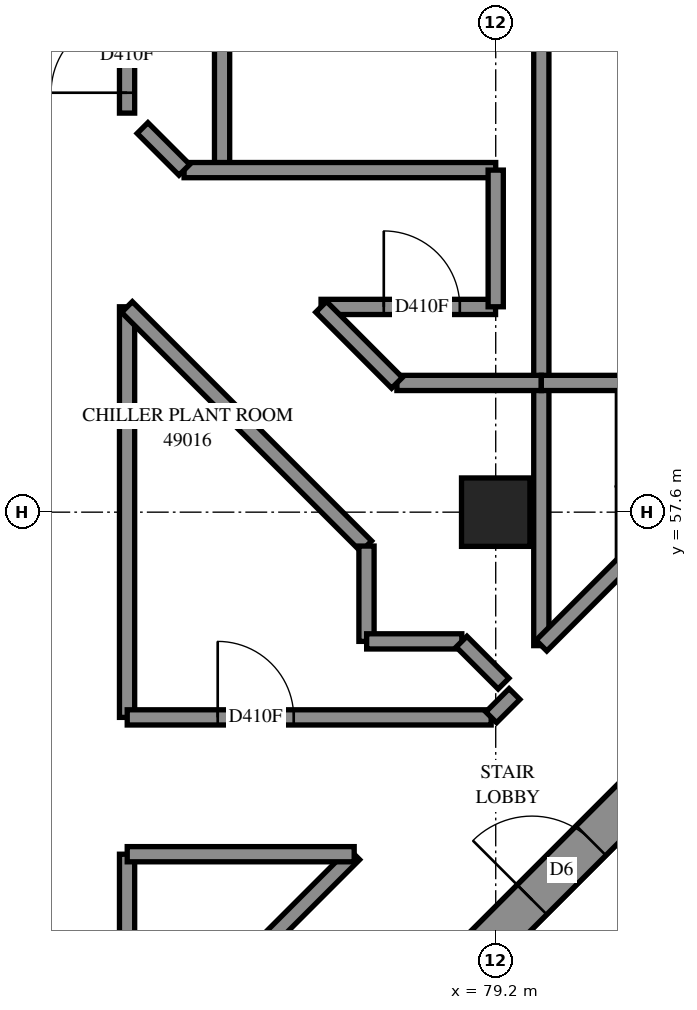
"""IFC4 building model, lengths in metres.
Left out: names, types, materials, properties, quantities, classifications, styles, units other than length and angle.
Written with IfcOpenShell. Run it as: python <this file> out.ifc"""

import sys

from ifc_helpers import new_model, si_unit, direction, frame, frame_2d, origin, origin_2d, place, context, subcontext, project, spatial, polyline, rectangle, outline, extrude, element, fill, save


model = new_model("IFC4")
c1 = context("Model", 3, precision=1e-05, world=origin(), true_north=direction((0.0, 1.0)))
c2 = subcontext(c1, "Body", "Model", "MODEL_VIEW")
j1 = project(units=[si_unit("LENGTHUNIT", "METRE"), si_unit("PLANEANGLEUNIT", "RADIAN")], contexts=[c1])
p1 = place(None, origin())
s1 = spatial("IfcSite", under=j1, at=p1, CompositionType="ELEMENT")
p2 = place(p1, origin())
s2 = spatial("IfcBuilding", under=s1, at=p2, CompositionType="ELEMENT")
p3 = place(p2, frame((0.0, 0.0, 180.4)))
s3 = spatial("IfcBuildingStorey", under=s2, at=p3, CompositionType="ELEMENT", Elevation=180.4)
p4 = place(p3, frame((79.2, 57.6, 0.0), z_axis=(0.0, 0.0, 1.0), x_axis=(1.0, 0.0, 0.0)))
e1 = element("IfcColumn", 1, at=p4, inside=s3, PredefinedType="COLUMN", context=c2, shape_type="SweptSolid", body=[
    extrude(rectangle(XDim=0.9, YDim=0.9, at=origin_2d()), origin(), (0.0, 0.0, 1.0), 4.7),
])
p5 = place(p3, frame((76.46, 49.284, -0.3), z_axis=(0.0, 0.0, 1.0), x_axis=(0.7071067812, 0.7071067812, 0.0)))
e2 = element("IfcWall", 2, at=p5, inside=s3, PredefinedType="SHEAR", context=c2, shape_type="SweptSolid", body=[
    extrude(rectangle(XDim=14.4, YDim=0.55, at=frame_2d((7.2, 0.0))), origin(), (0.0, 0.0, 1.0), 4.3),
])
p6 = place(p5, frame((4.55, 0.0, 0.3)))
e3 = element("IfcOpeningElement", 3, at=p6, cuts=e2, PredefinedType="OPENING", context=c2, shape_type="SweptSolid", body=[
    extrude(rectangle(XDim=1.1, YDim=2.1, at=frame_2d((0.55, 1.05))), frame((0.0, 0.285, 0.0), z_axis=(0.0, -1.0, 0.0), x_axis=(1.0, 0.0, 0.0)), (0.0, 0.0, 1.0), 0.57),
])
p7 = place(p5, frame((11.35, 0.0, 0.3)))
e4 = element("IfcOpeningElement", 4, at=p7, cuts=e2, PredefinedType="OPENING", context=c2, shape_type="SweptSolid", body=[
    extrude(rectangle(XDim=1.1, YDim=2.1, at=frame_2d((0.55, 1.05))), frame((0.0, 0.285, 0.0), z_axis=(0.0, -1.0, 0.0), x_axis=(1.0, 0.0, 0.0)), (0.0, 0.0, 1.0), 0.57),
])
p8 = place(p3, frame((100.024, 48.241, 0.0), z_axis=(0.0, 0.0, 1.0), x_axis=(-0.7071067812, 0.7071067812, 0.0)))
e5 = element("IfcWall", 5, at=p8, inside=s3, PredefinedType="SOLIDWALL", context=c2, shape_type="SweptSolid", body=[
    extrude(outline(polyline([(-0.275, -0.275), (30.779, -0.275), (30.552, 0.275), (0.275, 0.275), (-0.275, -0.275)])), origin(), (0.0, 0.0, 1.0), 4.7),
])
p9 = place(p8, frame((3.625, 0.0, 0.9)))
e6 = element("IfcOpeningElement", 6, at=p9, cuts=e5, PredefinedType="OPENING", context=c2, shape_type="SweptSolid", body=[
    extrude(rectangle(XDim=1.8, YDim=3.6, at=frame_2d((0.9, 1.8))), frame((0.0, 0.285, 0.0), z_axis=(0.0, -1.0, 0.0), x_axis=(1.0, 0.0, 0.0)), (0.0, 0.0, 1.0), 0.57),
])
p10 = place(p8, frame((7.225, 0.0, 0.9)))
e7 = element("IfcOpeningElement", 7, at=p10, cuts=e5, PredefinedType="OPENING", context=c2, shape_type="SweptSolid", body=[
    extrude(rectangle(XDim=1.8, YDim=3.6, at=frame_2d((0.9, 1.8))), frame((0.0, 0.285, 0.0), z_axis=(0.0, -1.0, 0.0), x_axis=(1.0, 0.0, 0.0)), (0.0, 0.0, 1.0), 0.57),
])
p11 = place(p8, frame((10.825, 0.0, 0.9)))
e8 = element("IfcOpeningElement", 8, at=p11, cuts=e5, PredefinedType="OPENING", context=c2, shape_type="SweptSolid", body=[
    extrude(rectangle(XDim=1.8, YDim=3.6, at=frame_2d((0.9, 1.8))), frame((0.0, 0.285, 0.0), z_axis=(0.0, -1.0, 0.0), x_axis=(1.0, 0.0, 0.0)), (0.0, 0.0, 1.0), 0.57),
])
p12 = place(p8, frame((14.425, 0.0, 0.9)))
e9 = element("IfcOpeningElement", 9, at=p12, cuts=e5, PredefinedType="OPENING", context=c2, shape_type="SweptSolid", body=[
    extrude(rectangle(XDim=1.8, YDim=3.6, at=frame_2d((0.9, 1.8))), frame((0.0, 0.285, 0.0), z_axis=(0.0, -1.0, 0.0), x_axis=(1.0, 0.0, 0.0)), (0.0, 0.0, 1.0), 0.57),
])
p13 = place(p8, frame((17.575, 0.0, 0.9)))
e10 = element("IfcOpeningElement", 10, at=p13, cuts=e5, PredefinedType="OPENING", context=c2, shape_type="SweptSolid", body=[
    extrude(rectangle(XDim=1.8, YDim=3.6, at=frame_2d((0.9, 1.8))), frame((0.0, 0.285, 0.0), z_axis=(0.0, -1.0, 0.0), x_axis=(1.0, 0.0, 0.0)), (0.0, 0.0, 1.0), 0.57),
])
p14 = place(p8, frame((21.625, 0.0, 0.9)))
e11 = element("IfcOpeningElement", 11, at=p14, cuts=e5, PredefinedType="OPENING", context=c2, shape_type="SweptSolid", body=[
    extrude(rectangle(XDim=1.8, YDim=3.6, at=frame_2d((0.9, 1.8))), frame((0.0, 0.285, 0.0), z_axis=(0.0, -1.0, 0.0), x_axis=(1.0, 0.0, 0.0)), (0.0, 0.0, 1.0), 0.57),
])
p15 = place(p8, frame((25.225, 0.0, 0.9)))
e12 = element("IfcOpeningElement", 12, at=p15, cuts=e5, PredefinedType="OPENING", context=c2, shape_type="SweptSolid", body=[
    extrude(rectangle(XDim=1.8, YDim=3.6, at=frame_2d((0.9, 1.8))), frame((0.0, 0.285, 0.0), z_axis=(0.0, -1.0, 0.0), x_axis=(1.0, 0.0, 0.0)), (0.0, 0.0, 1.0), 0.57),
])
p16 = place(p8, frame((28.438, 0.0, 0.9)))
e13 = element("IfcOpeningElement", 13, at=p16, cuts=e5, PredefinedType="OPENING", context=c2, shape_type="SweptSolid", body=[
    extrude(rectangle(XDim=1.8, YDim=3.6, at=frame_2d((0.9, 1.8))), frame((0.0, 0.285, 0.0), z_axis=(0.0, -1.0, 0.0), x_axis=(1.0, 0.0, 0.0)), (0.0, 0.0, 1.0), 0.57),
])
p17 = place(p3, frame((102.747, 49.938, 0.0), z_axis=(0.0, 0.0, 1.0), x_axis=(-0.7071083109, 0.7071052514, 0.0)))
e14 = element("IfcWall", 14, at=p17, inside=s3, PredefinedType="SOLIDWALL", context=c2, shape_type="SweptSolid", body=[
    extrude(outline(polyline([(-0.1, -0.1), (32.726, -0.1), (32.644, 0.1), (0.1, 0.1), (-0.1, -0.1)])), origin(), (0.0, 0.0, 1.0), 4.7),
])
p18 = place(p3, frame((79.8, 59.3, 0.0), z_axis=(0.0, 0.0, 1.0), x_axis=(0.0, 1.0, 0.0)))
e15 = element("IfcWall", 15, at=p18, inside=s3, PredefinedType="PARTITIONING", context=c2, shape_type="SweptSolid", body=[
    extrude(rectangle(XDim=8.777, YDim=0.2, at=frame_2d((4.388, 0.0))), origin(), (0.0, 0.0, 1.0), 4.7),
])
p19 = place(p3, frame((75.6, 62.1, 0.0), z_axis=(0.0, 0.0, 1.0), x_axis=(0.0, 1.0, 0.0)))
e16 = element("IfcWall", 16, at=p19, inside=s3, PredefinedType="PARTITIONING", context=c2, shape_type="SweptSolid", body=[
    extrude(rectangle(XDim=7.55, YDim=0.2, at=frame_2d((3.775, 0.0))), origin(), (0.0, 0.0, 1.0), 4.7),
])
p20 = place(p3, frame((74.35, 54.9, 0.0), z_axis=(0.0, 0.0, 1.0), x_axis=(0.0, 1.0, 0.0)))
e17 = element("IfcWall", 17, at=p20, inside=s3, PredefinedType="PARTITIONING", context=c2, shape_type="SweptSolid", body=[
    extrude(rectangle(XDim=5.402, YDim=0.2, at=frame_2d((2.701, 0.0))), origin(), (0.0, 0.0, 1.0), 4.7),
])
p21 = place(p3, frame((74.352, 54.9, 0.0), z_axis=(0.0, 0.0, 1.0), x_axis=(1.0, 0.0, 0.0)))
e18 = element("IfcWall", 18, at=p21, inside=s3, PredefinedType="PARTITIONING", context=c2, shape_type="SweptSolid", body=[
    extrude(rectangle(XDim=4.788, YDim=0.2, at=frame_2d((2.394, 0.0))), origin(), (0.0, 0.0, 1.0), 4.7),
])
p22 = place(p21, frame((1.19, 0.0, 0.0)))
e19 = element("IfcOpeningElement", 19, at=p22, cuts=e18, PredefinedType="OPENING", context=c2, shape_type="SweptSolid", body=[
    extrude(rectangle(XDim=1.0, YDim=2.1, at=frame_2d((0.5, 1.05))), frame((0.0, 0.11, 0.0), z_axis=(0.0, -1.0, 0.0), x_axis=(1.0, 0.0, 0.0)), (0.0, 0.0, 1.0), 0.22),
])
p23 = place(p3, frame((74.349, 60.299, 0.0), z_axis=(0.0, 0.0, 1.0), x_axis=(0.7071067812, -0.7071067812, 0.0)))
e20 = element("IfcWall", 20, at=p23, inside=s3, PredefinedType="PARTITIONING", context=c2, shape_type="SweptSolid", body=[
    extrude(rectangle(XDim=4.452, YDim=0.2, at=frame_2d((2.226, 0.0))), origin(), (0.0, 0.0, 1.0), 4.7),
])
p24 = place(p3, frame((74.35, 62.85, 0.0), z_axis=(0.0, 0.0, 1.0), x_axis=(0.0, 1.0, 0.0)))
e21 = element("IfcWall", 21, at=p24, inside=s3, PredefinedType="PARTITIONING", context=c2, shape_type="SweptSolid", body=[
    extrude(rectangle(XDim=4.3, YDim=0.2, at=frame_2d((2.15, 0.0))), origin(), (0.0, 0.0, 1.0), 4.7),
])
p25 = place(p24, frame((0.268, 0.0, 0.0)))
e22 = element("IfcOpeningElement", 22, at=p25, cuts=e21, PredefinedType="OPENING", context=c2, shape_type="SweptSolid", body=[
    extrude(rectangle(XDim=1.0, YDim=2.1, at=frame_2d((0.5, 1.05))), frame((0.0, 0.11, 0.0), z_axis=(0.0, -1.0, 0.0), x_axis=(1.0, 0.0, 0.0)), (0.0, 0.0, 1.0), 0.22),
])
p26 = place(p3, frame((74.351, 50.111, 0.0), z_axis=(0.0, 0.0, 1.0), x_axis=(0.7071067812, 0.7071067812, 0.0)))
e23 = element("IfcWall", 23, at=p26, inside=s3, PredefinedType="PARTITIONING", context=c2, shape_type="SweptSolid", body=[
    extrude(rectangle(XDim=4.226, YDim=0.2, at=frame_2d((2.113, 0.0))), origin(), (0.0, 0.0, 1.0), 4.7),
])
p27 = place(p3, frame((75.1, 62.1, 0.0), z_axis=(0.0, 0.0, 1.0), x_axis=(1.0, 0.0, 0.0)))
e24 = element("IfcWall", 24, at=p27, inside=s3, PredefinedType="PARTITIONING", context=c2, shape_type="SweptSolid", body=[
    extrude(rectangle(XDim=4.1, YDim=0.2, at=frame_2d((2.05, 0.0))), origin(), (0.0, 0.0, 1.0), 4.7),
])
p28 = place(p3, frame((79.8, 55.844, 0.0), z_axis=(0.0, 0.0, 1.0), x_axis=(0.0, 1.0, 0.0)))
e25 = element("IfcWall", 25, at=p28, inside=s3, PredefinedType="PARTITIONING", context=c2, shape_type="SweptSolid", body=[
    extrude(rectangle(XDim=3.456, YDim=0.2, at=frame_2d((1.728, 0.0))), origin(), (0.0, 0.0, 1.0), 4.7),
])
p29 = place(p3, frame((74.35, 50.112, 0.0), z_axis=(0.0, 0.0, 1.0), x_axis=(0.0, 1.0, 0.0)))
e26 = element("IfcWall", 26, at=p29, inside=s3, PredefinedType="PARTITIONING", context=c2, shape_type="SweptSolid", body=[
    extrude(rectangle(XDim=2.988, YDim=0.2, at=frame_2d((1.494, 0.0))), origin(), (0.0, 0.0, 1.0), 4.7),
])
p30 = place(p3, frame((74.352, 53.1, 0.0), z_axis=(0.0, 0.0, 1.0), x_axis=(1.0, 0.0, 0.0)))
e27 = element("IfcWall", 27, at=p30, inside=s3, PredefinedType="PARTITIONING", context=c2, shape_type="SweptSolid", body=[
    extrude(rectangle(XDim=2.986, YDim=0.2, at=frame_2d((1.493, 0.0))), origin(), (0.0, 0.0, 1.0), 4.7),
])
p31 = place(p3, frame((76.902, 60.3, 0.0), z_axis=(0.0, 0.0, 1.0), x_axis=(1.0, 0.0, 0.0)))
e28 = element("IfcWall", 28, at=p31, inside=s3, PredefinedType="PARTITIONING", context=c2, shape_type="SweptSolid", body=[
    extrude(rectangle(XDim=2.296, YDim=0.2, at=frame_2d((1.148, 0.0))), origin(), (0.0, 0.0, 1.0), 4.7),
])
p32 = place(p31, frame((0.825, 0.0, 0.0)))
e29 = element("IfcOpeningElement", 29, at=p32, cuts=e28, PredefinedType="OPENING", context=c2, shape_type="SweptSolid", body=[
    extrude(rectangle(XDim=1.0, YDim=2.1, at=frame_2d((0.5, 1.05))), frame((0.0, 0.11, 0.0), z_axis=(0.0, -1.0, 0.0), x_axis=(1.0, 0.0, 0.0)), (0.0, 0.0, 1.0), 0.22),
])
p33 = place(p3, frame((77.9, 59.3, 0.0), z_axis=(0.0, 0.0, 1.0), x_axis=(1.0, 0.0, 0.0)))
e30 = element("IfcWall", 30, at=p33, inside=s3, PredefinedType="PARTITIONING", context=c2, shape_type="SweptSolid", body=[
    extrude(rectangle(XDim=1.9, YDim=0.2, at=frame_2d((0.95, 0.0))), origin(), (0.0, 0.0, 1.0), 4.7),
])
p34 = place(p3, frame((79.2, 60.302, 0.0), z_axis=(0.0, 0.0, 1.0), x_axis=(0.0, 1.0, 0.0)))
e31 = element("IfcWall", 31, at=p34, inside=s3, PredefinedType="PARTITIONING", context=c2, shape_type="SweptSolid", body=[
    extrude(rectangle(XDim=1.798, YDim=0.2, at=frame_2d((0.899, 0.0))), origin(), (0.0, 0.0, 1.0), 4.7),
])
p35 = place(p3, frame((79.801, 55.845, 0.0), z_axis=(0.0, 0.0, 1.0), x_axis=(0.7071067812, 0.7071067812, 0.0)))
e32 = element("IfcWall", 32, at=p35, inside=s3, PredefinedType="PARTITIONING", context=c2, shape_type="SweptSolid", body=[
    extrude(rectangle(XDim=1.553, YDim=0.2, at=frame_2d((0.776, 0.0))), origin(), (0.0, 0.0, 1.0), 4.7),
])
p36 = place(p3, frame((76.903, 60.301, 0.0), z_axis=(0.0, 0.0, 1.0), x_axis=(0.7063986127, -0.7078142412, 0.0)))
e33 = element("IfcWall", 33, at=p36, inside=s3, PredefinedType="PARTITIONING", context=c2, shape_type="SweptSolid", body=[
    extrude(rectangle(XDim=1.413, YDim=0.2, at=frame_2d((0.706, 0.0))), origin(), (0.0, 0.0, 1.0), 4.7),
])
p37 = place(p3, frame((77.5, 55.9, 0.0), z_axis=(0.0, 0.0, 1.0), x_axis=(0.0, 1.0, 0.0)))
e34 = element("IfcWall", 34, at=p37, inside=s3, PredefinedType="PARTITIONING", context=c2, shape_type="SweptSolid", body=[
    extrude(rectangle(XDim=1.254, YDim=0.2, at=frame_2d((0.627, 0.0))), origin(), (0.0, 0.0, 1.0), 4.7),
])
p38 = place(p3, frame((77.502, 55.9, 0.0), z_axis=(0.0, 0.0, 1.0), x_axis=(1.0, 0.0, 0.0)))
e35 = element("IfcWall", 35, at=p38, inside=s3, PredefinedType="PARTITIONING", context=c2, shape_type="SweptSolid", body=[
    extrude(rectangle(XDim=1.252, YDim=0.2, at=frame_2d((0.626, 0.0))), origin(), (0.0, 0.0, 1.0), 4.7),
])
p39 = place(p3, frame((79.8, 59.3, 0.0), z_axis=(0.0, 0.0, 1.0), x_axis=(1.0, 0.0, 0.0)))
e36 = element("IfcWall", 36, at=p39, inside=s3, PredefinedType="PARTITIONING", context=c2, shape_type="SweptSolid", body=[
    extrude(rectangle(XDim=1.098, YDim=0.2, at=frame_2d((0.549, 0.0))), origin(), (0.0, 0.0, 1.0), 4.7),
])
p40 = place(p3, frame((78.751, 55.897, 0.0), z_axis=(0.0, 0.0, 1.0), x_axis=(0.7071067812, -0.7071067812, 0.0)))
e37 = element("IfcWall", 37, at=p40, inside=s3, PredefinedType="PARTITIONING", context=c2, shape_type="SweptSolid", body=[
    extrude(rectangle(XDim=0.781, YDim=0.2, at=frame_2d((0.39, 0.0))), origin(), (0.0, 0.0, 1.0), 4.7),
])
p41 = place(p3, frame((74.553, 62.654, 0.0), z_axis=(0.0, 0.0, 1.0), x_axis=(0.7071067812, -0.7071067812, 0.0)))
e38 = element("IfcWall", 38, at=p41, inside=s3, PredefinedType="PARTITIONING", context=c2, shape_type="SweptSolid", body=[
    extrude(rectangle(XDim=0.778, YDim=0.2, at=frame_2d((0.389, 0.0))), origin(), (0.0, 0.0, 1.0), 4.7),
])
p42 = place(p3, frame((79.141, 54.901, 0.0), z_axis=(0.0, 0.0, 1.0), x_axis=(0.7071067812, 0.7071067812, 0.0)))
e39 = element("IfcWall", 39, at=p42, inside=s3, PredefinedType="PARTITIONING", context=c2, shape_type="SweptSolid", body=[
    extrude(rectangle(XDim=0.433, YDim=0.2, at=frame_2d((0.216, 0.0))), origin(), (0.0, 0.0, 1.0), 4.7),
])
p43 = place(p6, origin())
e40 = element("IfcDoor", 40, at=p43, inside=s3, OperationType="DOUBLE_DOOR_SINGLE_SWING", PredefinedType="DOOR", context=c2, shape_type="SweptSolid", body=[
    extrude(rectangle(XDim=1.1, YDim=2.1, at=frame_2d((0.55, 1.05))), frame((0.0, 0.025, 0.0), z_axis=(0.0, -1.0, 0.0), x_axis=(1.0, 0.0, 0.0)), (0.0, 0.0, 1.0), 0.05),
])
fill(e3, e40)
p44 = place(p22, origin())
e41 = element("IfcDoor", 41, at=p44, inside=s3, OperationType="SINGLE_SWING_LEFT", PredefinedType="DOOR", context=c2, shape_type="SweptSolid", body=[
    extrude(rectangle(XDim=1.0, YDim=2.1, at=frame_2d((0.5, 1.05))), frame((0.0, 0.025, 0.0), z_axis=(0.0, -1.0, 0.0), x_axis=(1.0, 0.0, 0.0)), (0.0, 0.0, 1.0), 0.05),
])
fill(e19, e41)
p45 = place(p25, origin())
e42 = element("IfcDoor", 42, at=p45, inside=s3, OperationType="SINGLE_SWING_RIGHT", PredefinedType="DOOR", context=c2, shape_type="SweptSolid", body=[
    extrude(rectangle(XDim=1.0, YDim=2.1, at=frame_2d((0.5, 1.05))), frame((0.0, 0.025, 0.0), z_axis=(0.0, -1.0, 0.0), x_axis=(1.0, 0.0, 0.0)), (0.0, 0.0, 1.0), 0.05),
])
fill(e22, e42)
p46 = place(p32, origin())
e43 = element("IfcDoor", 43, at=p46, inside=s3, OperationType="SINGLE_SWING_LEFT", PredefinedType="DOOR", context=c2, shape_type="SweptSolid", body=[
    extrude(rectangle(XDim=1.0, YDim=2.1, at=frame_2d((0.5, 1.05))), frame((0.0, 0.025, 0.0), z_axis=(0.0, -1.0, 0.0), x_axis=(1.0, 0.0, 0.0)), (0.0, 0.0, 1.0), 0.05),
])
fill(e29, e43)
save(model, sys.argv[1])
